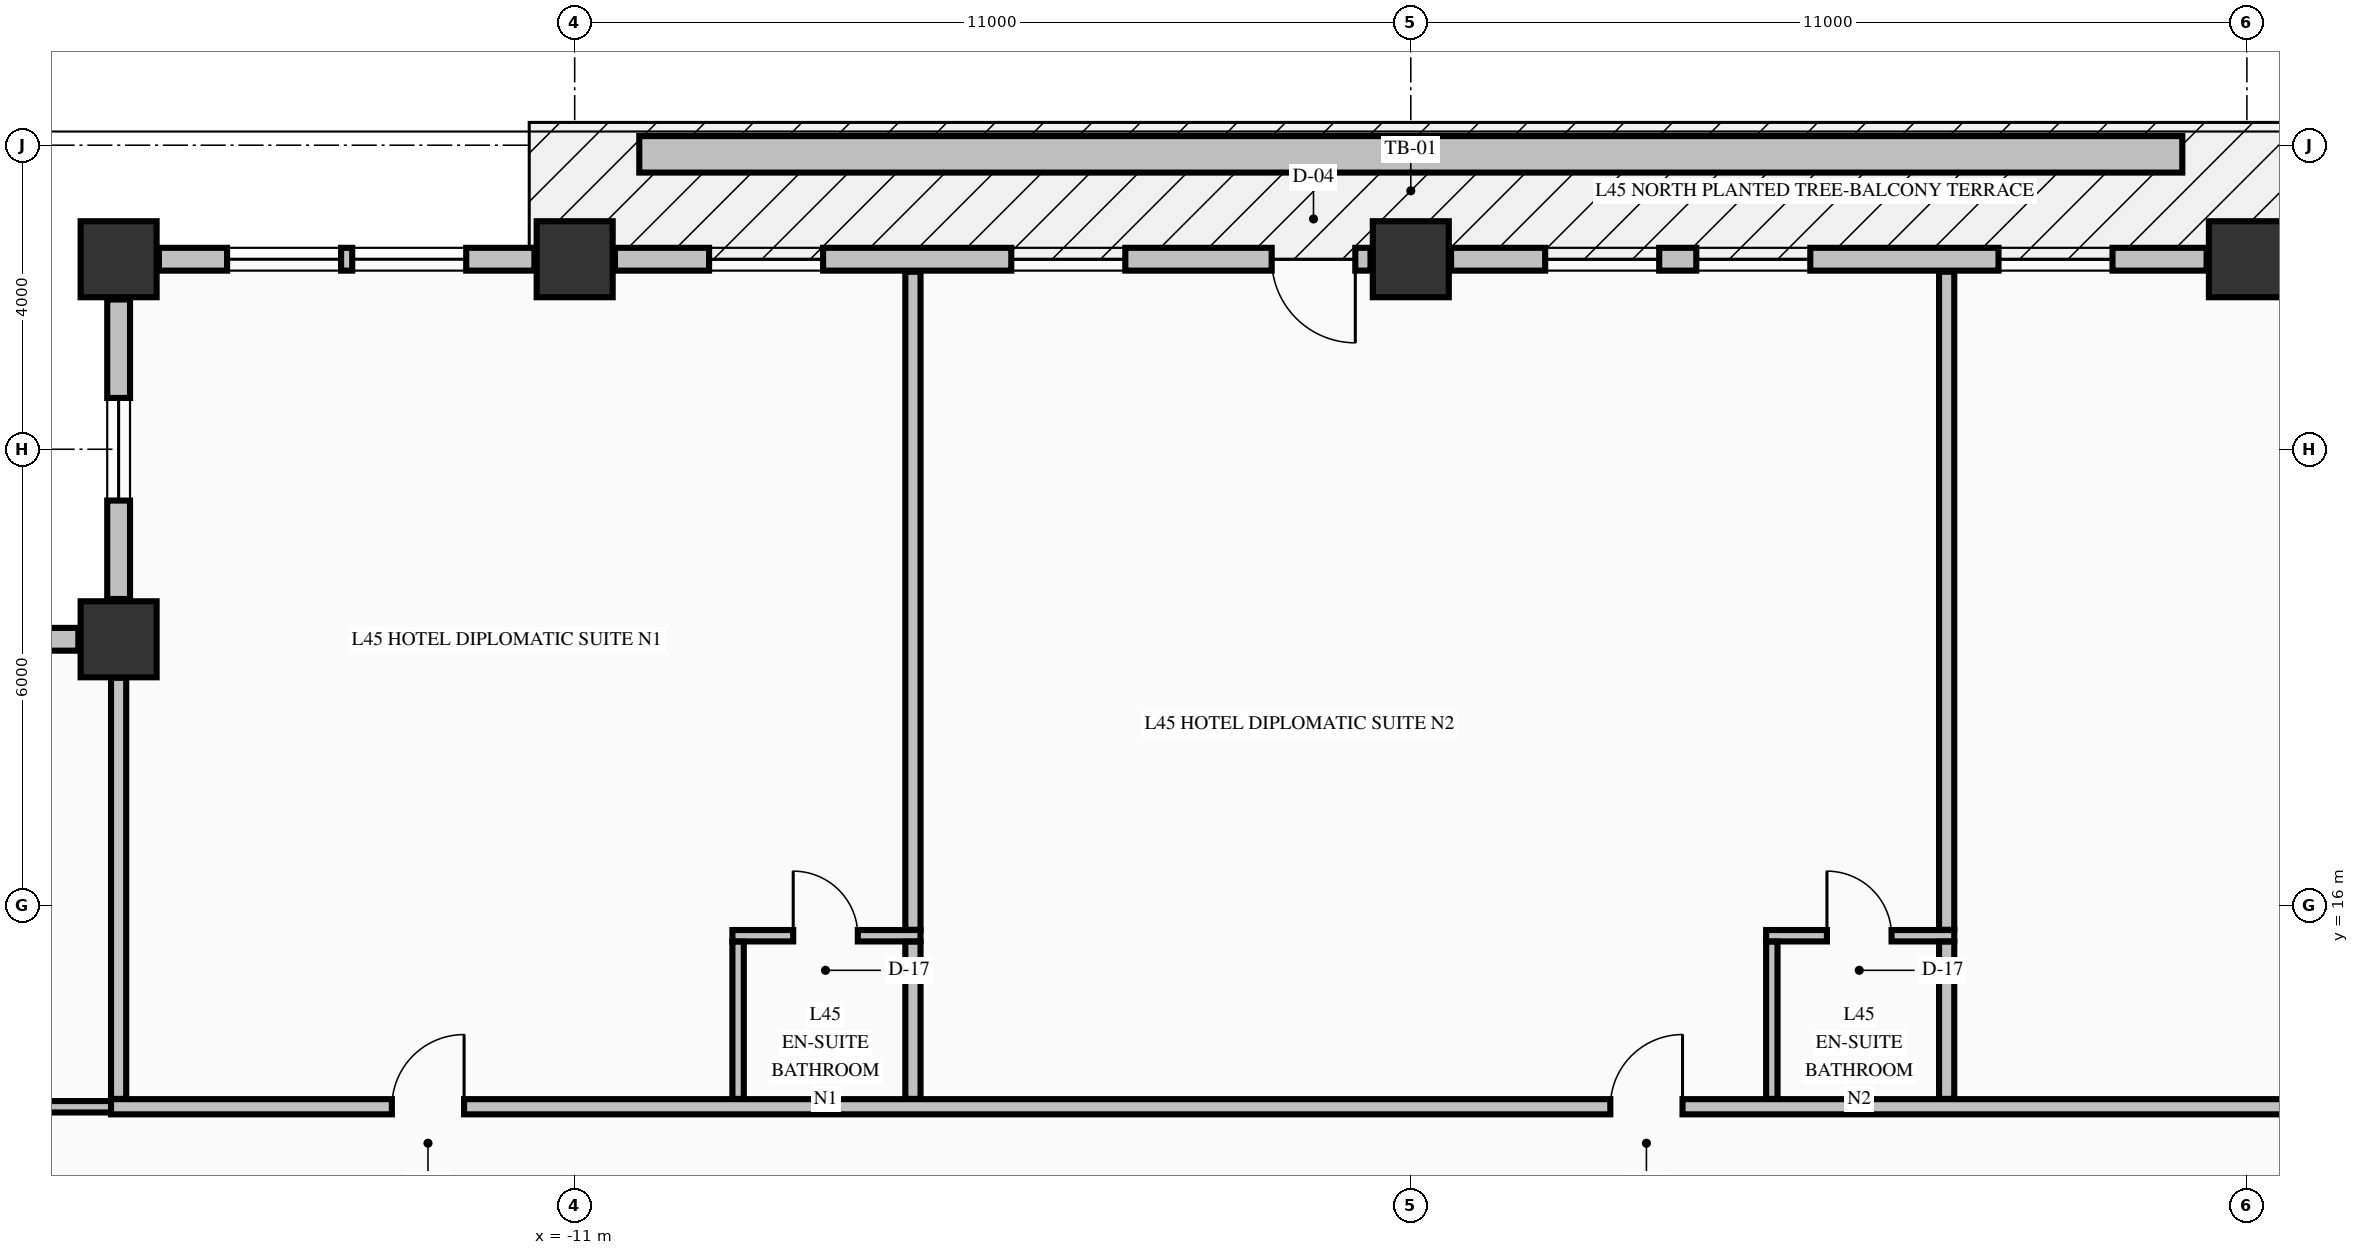
"""IFC4 building model, lengths in metres.
Left out: names, types, materials, properties, quantities, classifications, styles, units other than length and angle.
Written with IfcOpenShell. Run it as: python <this file> out.ifc"""

import sys

from ifc_helpers import new_model, si_unit, direction, frame, frame_2d, origin, origin_2d, place, context, subcontext, project, spatial, rectangle, extrude, element, fill, save


model = new_model("IFC4")
c1 = context("Model", 3, precision=1e-05, world=origin(), true_north=direction((0.0, 1.0)))
c2 = subcontext(c1, "Body", "Model", "MODEL_VIEW")
j1 = project(units=[si_unit("LENGTHUNIT", "METRE"), si_unit("PLANEANGLEUNIT", "RADIAN")], contexts=[c1])
p1 = place(None, origin())
s1 = spatial("IfcSite", under=j1, at=p1, CompositionType="ELEMENT")
p2 = place(p1, origin())
s2 = spatial("IfcBuilding", under=s1, at=p2, CompositionType="ELEMENT")
p3 = place(p2, frame((0.0, 0.0, 176.26)))
s3 = spatial("IfcBuildingStorey", under=s2, at=p3, CompositionType="ELEMENT", Elevation=176.26)
for number, where, z_axis, x_axis in (
    (1, (-17.0, 24.5, -0.275), (0.0, 0.0, 1.0), (1.0, 0.0, 0.0)),
    (2, (-11.0, 24.5, -0.275), (0.0, 0.0, 1.0), (1.0, 0.0, 0.0)),
    (3, (0.0, 24.5, -0.275), (0.0, 0.0, 1.0), (1.0, 0.0, 0.0)),
    (4, (11.0, 24.5, -0.275), (0.0, 0.0, 1.0), (1.0, 0.0, 0.0)),
    (5, (-17.0, 19.5, -0.275), (0.0, 0.0, 1.0), (1.0, 0.0, 0.0)),
):
    element("IfcColumn", number, at=place(p3, frame(where, z_axis=z_axis, x_axis=x_axis)), inside=s3, PredefinedType="COLUMN", context=c2, shape_type="SweptSolid", body=[
        extrude(rectangle(XDim=1.0, YDim=1.0, at=origin_2d()), origin(), (0.0, 0.0, 1.0), 3.425),
    ])
p4 = place(p3, frame((-17.0, 23.97, 0.0), z_axis=(0.0, 0.0, 1.0), x_axis=(0.0, -1.0, 0.0)))
e6 = element("IfcWall", 6, at=p4, inside=s3, PredefinedType="STANDARD", context=c2, shape_type="SweptSolid", body=[
    extrude(rectangle(XDim=3.94, YDim=0.3, at=frame_2d((1.97, 0.0))), origin(), (0.0, 0.0, 1.0), 2.542),
])
p5 = place(p4, frame((1.295, 0.0, 0.68)))
e7 = element("IfcOpeningElement", 7, at=p5, cuts=e6, PredefinedType="OPENING", context=c2, shape_type="SweptSolid", body=[
    extrude(rectangle(XDim=1.35, YDim=1.42, at=frame_2d((0.675, 0.71))), frame((0.0, 0.16, 0.0), z_axis=(0.0, -1.0, 0.0), x_axis=(1.0, 0.0, 0.0)), (0.0, 0.0, 1.0), 0.32),
])
p6 = place(p3, frame((-17.53, 19.5, 0.0), z_axis=(0.0, 0.0, 1.0), x_axis=(-1.0, 0.0, 0.0)))
e8 = element("IfcWall", 8, at=p6, inside=s3, PredefinedType="STANDARD", context=c2, shape_type="SweptSolid", body=[
    extrude(rectangle(XDim=3.94, YDim=0.3, at=frame_2d((1.97, 0.0))), origin(), (0.0, 0.0, 1.0), 2.542),
])
p7 = place(p6, frame((1.295, 0.0, 0.68)))
e9 = element("IfcOpeningElement", 9, at=p7, cuts=e8, PredefinedType="OPENING", context=c2, shape_type="SweptSolid", body=[
    extrude(rectangle(XDim=1.35, YDim=1.42, at=frame_2d((0.675, 0.71))), frame((0.0, 0.16, 0.0), z_axis=(0.0, -1.0, 0.0), x_axis=(1.0, 0.0, 0.0)), (0.0, 0.0, 1.0), 0.32),
])
p8 = place(p3, frame((-11.53, 24.5, 0.0), z_axis=(0.0, 0.0, 1.0), x_axis=(-1.0, 0.0, 0.0)))
e10 = element("IfcWall", 10, at=p8, inside=s3, PredefinedType="STANDARD", context=c2, shape_type="SweptSolid", body=[
    extrude(rectangle(XDim=4.94, YDim=0.3, at=frame_2d((2.47, 0.0))), origin(), (0.0, 0.0, 1.0), 2.542),
])
p9 = place(p8, frame((0.897, 0.0, 0.72)))
e11 = element("IfcOpeningElement", 11, at=p9, cuts=e10, PredefinedType="OPENING", context=c2, shape_type="SweptSolid", body=[
    extrude(rectangle(XDim=1.5, YDim=1.6, at=frame_2d((0.75, 0.8))), frame((0.0, 0.16, 0.0), z_axis=(0.0, -1.0, 0.0), x_axis=(1.0, 0.0, 0.0)), (0.0, 0.0, 1.0), 0.32),
])
p10 = place(p8, frame((2.543, 0.0, 0.72)))
e12 = element("IfcOpeningElement", 12, at=p10, cuts=e10, PredefinedType="OPENING", context=c2, shape_type="SweptSolid", body=[
    extrude(rectangle(XDim=1.5, YDim=1.6, at=frame_2d((0.75, 0.8))), frame((0.0, 0.16, 0.0), z_axis=(0.0, -1.0, 0.0), x_axis=(1.0, 0.0, 0.0)), (0.0, 0.0, 1.0), 0.32),
])
p11 = place(p3, frame((-0.53, 24.5, 0.0), z_axis=(0.0, 0.0, 1.0), x_axis=(-1.0, 0.0, 0.0)))
e13 = element("IfcWall", 13, at=p11, inside=s3, PredefinedType="STANDARD", context=c2, shape_type="SweptSolid", body=[
    extrude(rectangle(XDim=9.94, YDim=0.3, at=frame_2d((4.97, 0.0))), origin(), (0.0, 0.0, 1.0), 2.542),
])
p12 = place(p11, frame((0.2, 0.0, 0.0)))
e14 = element("IfcOpeningElement", 14, at=p12, cuts=e13, PredefinedType="OPENING", context=c2, shape_type="SweptSolid", body=[
    extrude(rectangle(XDim=1.1, YDim=2.15, at=frame_2d((0.55, 1.075))), frame((0.0, 0.16, 0.0), z_axis=(0.0, -1.0, 0.0), x_axis=(1.0, 0.0, 0.0)), (0.0, 0.0, 1.0), 0.32),
])
p13 = place(p11, frame((3.226, 0.0, 0.72)))
e15 = element("IfcOpeningElement", 15, at=p13, cuts=e13, PredefinedType="OPENING", context=c2, shape_type="SweptSolid", body=[
    extrude(rectangle(XDim=1.5, YDim=1.6, at=frame_2d((0.75, 0.8))), frame((0.0, 0.16, 0.0), z_axis=(0.0, -1.0, 0.0), x_axis=(1.0, 0.0, 0.0)), (0.0, 0.0, 1.0), 0.32),
])
p14 = place(p11, frame((7.202, 0.0, 0.72)))
e16 = element("IfcOpeningElement", 16, at=p14, cuts=e13, PredefinedType="OPENING", context=c2, shape_type="SweptSolid", body=[
    extrude(rectangle(XDim=1.5, YDim=1.6, at=frame_2d((0.75, 0.8))), frame((0.0, 0.16, 0.0), z_axis=(0.0, -1.0, 0.0), x_axis=(1.0, 0.0, 0.0)), (0.0, 0.0, 1.0), 0.32),
])
p15 = place(p3, frame((10.47, 24.5, 0.0), z_axis=(0.0, 0.0, 1.0), x_axis=(-1.0, 0.0, 0.0)))
e17 = element("IfcWall", 17, at=p15, inside=s3, PredefinedType="STANDARD", context=c2, shape_type="SweptSolid", body=[
    extrude(rectangle(XDim=9.94, YDim=0.3, at=frame_2d((4.97, 0.0))), origin(), (0.0, 0.0, 1.0), 2.542),
])
p16 = place(p15, frame((1.238, 0.0, 0.72)))
e18 = element("IfcOpeningElement", 18, at=p16, cuts=e17, PredefinedType="OPENING", context=c2, shape_type="SweptSolid", body=[
    extrude(rectangle(XDim=1.5, YDim=1.6, at=frame_2d((0.75, 0.8))), frame((0.0, 0.16, 0.0), z_axis=(0.0, -1.0, 0.0), x_axis=(1.0, 0.0, 0.0)), (0.0, 0.0, 1.0), 0.32),
])
p17 = place(p15, frame((5.214, 0.0, 0.72)))
e19 = element("IfcOpeningElement", 19, at=p17, cuts=e17, PredefinedType="OPENING", context=c2, shape_type="SweptSolid", body=[
    extrude(rectangle(XDim=1.5, YDim=1.6, at=frame_2d((0.75, 0.8))), frame((0.0, 0.16, 0.0), z_axis=(0.0, -1.0, 0.0), x_axis=(1.0, 0.0, 0.0)), (0.0, 0.0, 1.0), 0.32),
])
p18 = place(p15, frame((7.202, 0.0, 0.72)))
e20 = element("IfcOpeningElement", 20, at=p18, cuts=e17, PredefinedType="OPENING", context=c2, shape_type="SweptSolid", body=[
    extrude(rectangle(XDim=1.5, YDim=1.6, at=frame_2d((0.75, 0.8))), frame((0.0, 0.16, 0.0), z_axis=(0.0, -1.0, 0.0), x_axis=(1.0, 0.0, 0.0)), (0.0, 0.0, 1.0), 0.32),
])
p19 = place(p3, frame((-20.075, 13.35, 0.0), z_axis=(0.0, 0.0, 1.0), x_axis=(1.0, 0.0, 0.0)))
e21 = element("IfcWall", 21, at=p19, inside=s3, PredefinedType="PARTITIONING", context=c2, shape_type="SweptSolid", body=[
    extrude(rectangle(XDim=3.175, YDim=0.15, at=frame_2d((1.587, 0.0))), origin(), (0.0, 0.0, 1.0), 3.15),
])
p20 = place(p3, frame((-17.1, 13.35, 0.0), z_axis=(0.0, 0.0, 1.0), x_axis=(1.0, 0.0, 0.0)))
e22 = element("IfcWall", 22, at=p20, inside=s3, PredefinedType="PARTITIONING", context=c2, shape_type="SweptSolid", body=[
    extrude(rectangle(XDim=39.2, YDim=0.2, at=frame_2d((19.6, 0.0))), origin(), (0.0, 0.0, 1.0), 3.15),
])
p21 = place(p20, frame((3.695, 0.0, 0.0)))
e23 = element("IfcOpeningElement", 23, at=p21, cuts=e22, PredefinedType="OPENING", context=c2, shape_type="SweptSolid", body=[
    extrude(rectangle(XDim=0.95, YDim=2.15, at=frame_2d((0.475, 1.075))), frame((0.0, 0.11, 0.0), z_axis=(0.0, -1.0, 0.0), x_axis=(1.0, 0.0, 0.0)), (0.0, 0.0, 1.0), 0.22),
])
p22 = place(p20, frame((19.725, 0.0, 0.0)))
e24 = element("IfcOpeningElement", 24, at=p22, cuts=e22, PredefinedType="OPENING", context=c2, shape_type="SweptSolid", body=[
    extrude(rectangle(XDim=0.95, YDim=2.15, at=frame_2d((0.475, 1.075))), frame((0.0, 0.11, 0.0), z_axis=(0.0, -1.0, 0.0), x_axis=(1.0, 0.0, 0.0)), (0.0, 0.0, 1.0), 0.22),
])
p23 = place(p20, frame((30.005, 0.0, 0.0)))
e25 = element("IfcOpeningElement", 25, at=p23, cuts=e22, PredefinedType="OPENING", context=c2, shape_type="SweptSolid", body=[
    extrude(rectangle(XDim=0.95, YDim=2.15, at=frame_2d((0.475, 1.075))), frame((0.0, 0.11, 0.0), z_axis=(0.0, -1.0, 0.0), x_axis=(1.0, 0.0, 0.0)), (0.0, 0.0, 1.0), 0.22),
])
p24 = place(p3, frame((-8.925, 15.6, 0.0), z_axis=(0.0, 0.0, 1.0), x_axis=(1.0, 0.0, 0.0)))
e26 = element("IfcWall", 26, at=p24, inside=s3, PredefinedType="PARTITIONING", context=c2, shape_type="SweptSolid", body=[
    extrude(rectangle(XDim=2.475, YDim=0.15, at=frame_2d((1.238, 0.0))), origin(), (0.0, 0.0, 1.0), 3.15),
])
p25 = place(p24, frame((0.8, 0.0, 0.0)))
e27 = element("IfcOpeningElement", 27, at=p25, cuts=e26, PredefinedType="OPENING", context=c2, shape_type="SweptSolid", body=[
    extrude(rectangle(XDim=0.85, YDim=2.1, at=frame_2d((0.425, 1.05))), frame((0.0, 0.085, 0.0), z_axis=(0.0, -1.0, 0.0), x_axis=(1.0, 0.0, 0.0)), (0.0, 0.0, 1.0), 0.17),
])
p26 = place(p3, frame((4.675, 15.6, 0.0), z_axis=(0.0, 0.0, 1.0), x_axis=(1.0, 0.0, 0.0)))
e28 = element("IfcWall", 28, at=p26, inside=s3, PredefinedType="PARTITIONING", context=c2, shape_type="SweptSolid", body=[
    extrude(rectangle(XDim=2.475, YDim=0.15, at=frame_2d((1.237, 0.0))), origin(), (0.0, 0.0, 1.0), 3.15),
])
p27 = place(p26, frame((0.8, 0.0, 0.0)))
e29 = element("IfcOpeningElement", 29, at=p27, cuts=e28, PredefinedType="OPENING", context=c2, shape_type="SweptSolid", body=[
    extrude(rectangle(XDim=0.85, YDim=2.1, at=frame_2d((0.425, 1.05))), frame((0.0, 0.085, 0.0), z_axis=(0.0, -1.0, 0.0), x_axis=(1.0, 0.0, 0.0)), (0.0, 0.0, 1.0), 0.17),
])
p28 = place(p3, frame((-17.0, 13.453, 0.0), z_axis=(0.0, 0.0, 1.0), x_axis=(0.0, 1.0, 0.0)))
e30 = element("IfcWall", 30, at=p28, inside=s3, PredefinedType="PARTITIONING", context=c2, shape_type="SweptSolid", body=[
    extrude(rectangle(XDim=5.541, YDim=0.2, at=frame_2d((2.771, 0.0))), origin(), (0.0, 0.0, 1.0), 3.15),
])
p29 = place(p3, frame((-8.85, 13.453, 0.0), z_axis=(0.0, 0.0, 1.0), x_axis=(0.0, 1.0, 0.0)))
e31 = element("IfcWall", 31, at=p29, inside=s3, PredefinedType="PARTITIONING", context=c2, shape_type="SweptSolid", body=[
    extrude(rectangle(XDim=2.069, YDim=0.15, at=frame_2d((1.035, 0.0))), origin(), (0.0, 0.0, 1.0), 3.15),
])
p30 = place(p3, frame((-6.55, 13.453, 0.0), z_axis=(0.0, 0.0, 1.0), x_axis=(0.0, 1.0, 0.0)))
e32 = element("IfcWall", 32, at=p30, inside=s3, PredefinedType="PARTITIONING", context=c2, shape_type="SweptSolid", body=[
    extrude(rectangle(XDim=2.069, YDim=0.2, at=frame_2d((1.035, 0.0))), origin(), (0.0, 0.0, 1.0), 3.15),
])
p31 = place(p3, frame((-6.55, 15.678, 0.0), z_axis=(0.0, 0.0, 1.0), x_axis=(0.0, 1.0, 0.0)))
e33 = element("IfcWall", 33, at=p31, inside=s3, PredefinedType="PARTITIONING", context=c2, shape_type="SweptSolid", body=[
    extrude(rectangle(XDim=8.657, YDim=0.2, at=frame_2d((4.329, 0.0))), origin(), (0.0, 0.0, 1.0), 3.15),
])
p32 = place(p3, frame((4.75, 13.453, 0.0), z_axis=(0.0, 0.0, 1.0), x_axis=(0.0, 1.0, 0.0)))
e34 = element("IfcWall", 34, at=p32, inside=s3, PredefinedType="PARTITIONING", context=c2, shape_type="SweptSolid", body=[
    extrude(rectangle(XDim=2.069, YDim=0.15, at=frame_2d((1.035, 0.0))), origin(), (0.0, 0.0, 1.0), 3.15),
])
p33 = place(p3, frame((7.05, 13.453, 0.0), z_axis=(0.0, 0.0, 1.0), x_axis=(0.0, 1.0, 0.0)))
e35 = element("IfcWall", 35, at=p33, inside=s3, PredefinedType="PARTITIONING", context=c2, shape_type="SweptSolid", body=[
    extrude(rectangle(XDim=2.069, YDim=0.2, at=frame_2d((1.035, 0.0))), origin(), (0.0, 0.0, 1.0), 3.15),
])
p34 = place(p3, frame((7.05, 15.678, 0.0), z_axis=(0.0, 0.0, 1.0), x_axis=(0.0, 1.0, 0.0)))
e36 = element("IfcWall", 36, at=p34, inside=s3, PredefinedType="PARTITIONING", context=c2, shape_type="SweptSolid", body=[
    extrude(rectangle(XDim=8.657, YDim=0.2, at=frame_2d((4.329, 0.0))), origin(), (0.0, 0.0, 1.0), 3.15),
])
p35 = place(p3, frame((-10.15, 25.88, -0.04), z_axis=(0.0, 0.0, 1.0), x_axis=(1.0, 0.0, 0.0)))
e37 = element("IfcWall", 37, at=p35, inside=s3, PredefinedType="PARAPET", context=c2, shape_type="SweptSolid", body=[
    extrude(rectangle(XDim=20.3, YDim=0.48, at=frame_2d((10.15, 0.0))), origin(), (0.0, 0.0, 1.0), 0.52),
])
p36 = place(p5, origin())
e38 = element("IfcWindow", 38, at=p36, inside=s3, PartitioningType="SINGLE_PANEL", PredefinedType="WINDOW", context=c2, shape_type="SweptSolid", body=[
    extrude(rectangle(XDim=1.35, YDim=1.42, at=frame_2d((0.675, 0.71))), frame((0.0, 0.03, 0.0), z_axis=(0.0, -1.0, 0.0), x_axis=(1.0, 0.0, 0.0)), (0.0, 0.0, 1.0), 0.06),
])
fill(e7, e38)
p37 = place(p9, origin())
e39 = element("IfcWindow", 39, at=p37, inside=s3, PartitioningType="SINGLE_PANEL", PredefinedType="WINDOW", context=c2, shape_type="SweptSolid", body=[
    extrude(rectangle(XDim=1.5, YDim=1.6, at=frame_2d((0.75, 0.8))), frame((0.0, 0.03, 0.0), z_axis=(0.0, -1.0, 0.0), x_axis=(1.0, 0.0, 0.0)), (0.0, 0.0, 1.0), 0.06),
])
fill(e11, e39)
p38 = place(p10, origin())
e40 = element("IfcWindow", 40, at=p38, inside=s3, PartitioningType="SINGLE_PANEL", PredefinedType="WINDOW", context=c2, shape_type="SweptSolid", body=[
    extrude(rectangle(XDim=1.5, YDim=1.6, at=frame_2d((0.75, 0.8))), frame((0.0, 0.03, 0.0), z_axis=(0.0, -1.0, 0.0), x_axis=(1.0, 0.0, 0.0)), (0.0, 0.0, 1.0), 0.06),
])
fill(e12, e40)
p39 = place(p12, origin())
e41 = element("IfcDoor", 41, at=p39, inside=s3, OperationType="SINGLE_SWING_LEFT", PredefinedType="DOOR", context=c2, shape_type="SweptSolid", body=[
    extrude(rectangle(XDim=1.1, YDim=2.15, at=frame_2d((0.55, 1.075))), frame((0.0, 0.025, 0.0), z_axis=(0.0, -1.0, 0.0), x_axis=(1.0, 0.0, 0.0)), (0.0, 0.0, 1.0), 0.05),
])
fill(e14, e41)
p40 = place(p13, origin())
e42 = element("IfcWindow", 42, at=p40, inside=s3, PartitioningType="SINGLE_PANEL", PredefinedType="WINDOW", context=c2, shape_type="SweptSolid", body=[
    extrude(rectangle(XDim=1.5, YDim=1.6, at=frame_2d((0.75, 0.8))), frame((0.0, 0.03, 0.0), z_axis=(0.0, -1.0, 0.0), x_axis=(1.0, 0.0, 0.0)), (0.0, 0.0, 1.0), 0.06),
])
fill(e15, e42)
p41 = place(p14, origin())
e43 = element("IfcWindow", 43, at=p41, inside=s3, PartitioningType="SINGLE_PANEL", PredefinedType="WINDOW", context=c2, shape_type="SweptSolid", body=[
    extrude(rectangle(XDim=1.5, YDim=1.6, at=frame_2d((0.75, 0.8))), frame((0.0, 0.03, 0.0), z_axis=(0.0, -1.0, 0.0), x_axis=(1.0, 0.0, 0.0)), (0.0, 0.0, 1.0), 0.06),
])
fill(e16, e43)
p42 = place(p16, origin())
e44 = element("IfcWindow", 44, at=p42, inside=s3, PartitioningType="SINGLE_PANEL", PredefinedType="WINDOW", context=c2, shape_type="SweptSolid", body=[
    extrude(rectangle(XDim=1.5, YDim=1.6, at=frame_2d((0.75, 0.8))), frame((0.0, 0.03, 0.0), z_axis=(0.0, -1.0, 0.0), x_axis=(1.0, 0.0, 0.0)), (0.0, 0.0, 1.0), 0.06),
])
fill(e18, e44)
p43 = place(p17, origin())
e45 = element("IfcWindow", 45, at=p43, inside=s3, PartitioningType="SINGLE_PANEL", PredefinedType="WINDOW", context=c2, shape_type="SweptSolid", body=[
    extrude(rectangle(XDim=1.5, YDim=1.6, at=frame_2d((0.75, 0.8))), frame((0.0, 0.03, 0.0), z_axis=(0.0, -1.0, 0.0), x_axis=(1.0, 0.0, 0.0)), (0.0, 0.0, 1.0), 0.06),
])
fill(e19, e45)
p44 = place(p18, origin())
e46 = element("IfcWindow", 46, at=p44, inside=s3, PartitioningType="SINGLE_PANEL", PredefinedType="WINDOW", context=c2, shape_type="SweptSolid", body=[
    extrude(rectangle(XDim=1.5, YDim=1.6, at=frame_2d((0.75, 0.8))), frame((0.0, 0.03, 0.0), z_axis=(0.0, -1.0, 0.0), x_axis=(1.0, 0.0, 0.0)), (0.0, 0.0, 1.0), 0.06),
])
fill(e20, e46)
p45 = place(p21, origin())
e47 = element("IfcDoor", 47, at=p45, inside=s3, OperationType="SINGLE_SWING_RIGHT", PredefinedType="DOOR", context=c2, shape_type="SweptSolid", body=[
    extrude(rectangle(XDim=0.95, YDim=2.15, at=frame_2d((0.475, 1.075))), frame((0.0, 0.025, 0.0), z_axis=(0.0, -1.0, 0.0), x_axis=(1.0, 0.0, 0.0)), (0.0, 0.0, 1.0), 0.05),
])
fill(e23, e47)
p46 = place(p25, origin())
e48 = element("IfcDoor", 48, at=p46, inside=s3, OperationType="SINGLE_SWING_LEFT", PredefinedType="DOOR", context=c2, shape_type="SweptSolid", body=[
    extrude(rectangle(XDim=0.85, YDim=2.1, at=frame_2d((0.425, 1.05))), frame((0.0, 0.025, 0.0), z_axis=(0.0, -1.0, 0.0), x_axis=(1.0, 0.0, 0.0)), (0.0, 0.0, 1.0), 0.05),
])
fill(e27, e48)
p47 = place(p22, origin())
e49 = element("IfcDoor", 49, at=p47, inside=s3, OperationType="SINGLE_SWING_RIGHT", PredefinedType="DOOR", context=c2, shape_type="SweptSolid", body=[
    extrude(rectangle(XDim=0.95, YDim=2.15, at=frame_2d((0.475, 1.075))), frame((0.0, 0.025, 0.0), z_axis=(0.0, -1.0, 0.0), x_axis=(1.0, 0.0, 0.0)), (0.0, 0.0, 1.0), 0.05),
])
fill(e24, e49)
p48 = place(p27, origin())
e50 = element("IfcDoor", 50, at=p48, inside=s3, OperationType="SINGLE_SWING_LEFT", PredefinedType="DOOR", context=c2, shape_type="SweptSolid", body=[
    extrude(rectangle(XDim=0.85, YDim=2.1, at=frame_2d((0.425, 1.05))), frame((0.0, 0.025, 0.0), z_axis=(0.0, -1.0, 0.0), x_axis=(1.0, 0.0, 0.0)), (0.0, 0.0, 1.0), 0.05),
])
fill(e29, e50)
save(model, sys.argv[1])
